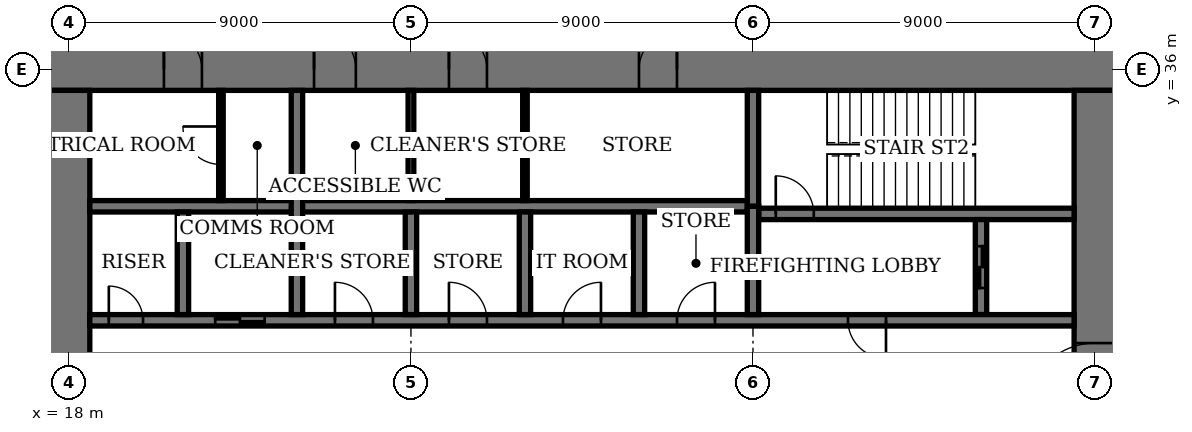
"""IFC4 building model, lengths in metres.
Left out: names, types, materials, properties, quantities, classifications, styles, units other than length and angle.
Written with IfcOpenShell. Run it as: python <this file> out.ifc"""

import sys

from ifc_helpers import new_model, si_unit, direction, frame, frame_2d, origin, place, context, subcontext, project, spatial, rectangle, extrude, element, fill, save


model = new_model("IFC4")
c1 = context("Model", 3, precision=1e-05, world=origin(), true_north=direction((0.0, 1.0)))
c2 = subcontext(c1, "Body", "Model", "MODEL_VIEW")
j1 = project(units=[si_unit("LENGTHUNIT", "METRE"), si_unit("PLANEANGLEUNIT", "RADIAN")], contexts=[c1])
p1 = place(None, origin())
s1 = spatial("IfcSite", under=j1, at=p1, CompositionType="ELEMENT")
p2 = place(p1, origin())
s2 = spatial("IfcBuilding", under=s1, at=p2, CompositionType="ELEMENT")
p3 = place(p2, frame((0.0, 0.0, 263.4)))
s3 = spatial("IfcBuildingStorey", under=s2, at=p3, CompositionType="ELEMENT", Elevation=263.4)
p4 = place(p3, frame((45.55, 36.0, 0.0), z_axis=(0.0, 0.0, 1.0), x_axis=(-1.0, 0.0, 0.0)))
e1 = element("IfcWall", 1, at=p4, inside=s3, PredefinedType="SHEAR", context=c2, shape_type="SweptSolid", body=[
    extrude(rectangle(XDim=28.1, YDim=1.1, at=frame_2d((14.05, 0.0))), origin(), (0.0, 0.0, 1.0), 4.0),
])
p5 = place(p4, frame((11.55, 0.0, 0.0)))
e2 = element("IfcOpeningElement", 2, at=p5, cuts=e1, PredefinedType="OPENING", context=c2, shape_type="SweptSolid", body=[
    extrude(rectangle(XDim=1.0, YDim=2.4, at=frame_2d((0.5, 1.2))), frame((0.0, 0.56, 0.0), z_axis=(0.0, -1.0, 0.0), x_axis=(1.0, 0.0, 0.0)), (0.0, 0.0, 1.0), 1.12),
])
p6 = place(p4, frame((16.55, 0.0, 0.0)))
e3 = element("IfcOpeningElement", 3, at=p6, cuts=e1, PredefinedType="OPENING", context=c2, shape_type="SweptSolid", body=[
    extrude(rectangle(XDim=1.0, YDim=2.4, at=frame_2d((0.5, 1.2))), frame((0.0, 0.56, 0.0), z_axis=(0.0, -1.0, 0.0), x_axis=(1.0, 0.0, 0.0)), (0.0, 0.0, 1.0), 1.12),
])
p7 = place(p4, frame((20.0, 0.0, 0.0)))
e4 = element("IfcOpeningElement", 4, at=p7, cuts=e1, PredefinedType="OPENING", context=c2, shape_type="SweptSolid", body=[
    extrude(rectangle(XDim=1.1, YDim=2.4, at=frame_2d((0.55, 1.2))), frame((0.0, 0.56, 0.0), z_axis=(0.0, -1.0, 0.0), x_axis=(1.0, 0.0, 0.0)), (0.0, 0.0, 1.0), 1.12),
])
p8 = place(p4, frame((24.05, 0.0, 0.0)))
e5 = element("IfcOpeningElement", 5, at=p8, cuts=e1, PredefinedType="OPENING", context=c2, shape_type="SweptSolid", body=[
    extrude(rectangle(XDim=1.0, YDim=2.4, at=frame_2d((0.5, 1.2))), frame((0.0, 0.56, 0.0), z_axis=(0.0, -1.0, 0.0), x_axis=(1.0, 0.0, 0.0)), (0.0, 0.0, 1.0), 1.12),
])
p9 = place(p3, frame((18.0, 35.45, 0.0), z_axis=(0.0, 0.0, 1.0), x_axis=(0.0, -1.0, 0.0)))
e6 = element("IfcWall", 6, at=p9, inside=s3, PredefinedType="SHEAR", context=c2, shape_type="SweptSolid", body=[
    extrude(rectangle(XDim=16.9, YDim=1.1, at=frame_2d((8.45, 0.0))), origin(), (0.0, 0.0, 1.0), 4.0),
])
p10 = place(p9, frame((8.45, 0.0, 0.0)))
e7 = element("IfcOpeningElement", 7, at=p10, cuts=e6, PredefinedType="OPENING", context=c2, shape_type="SweptSolid", body=[
    extrude(rectangle(XDim=1.8, YDim=2.4, at=frame_2d((0.9, 1.2))), frame((0.0, 0.56, 0.0), z_axis=(0.0, -1.0, 0.0), x_axis=(1.0, 0.0, 0.0)), (0.0, 0.0, 1.0), 1.12),
])
p11 = place(p3, frame((45.0, 18.55, 0.0), z_axis=(0.0, 0.0, 1.0), x_axis=(0.0, 1.0, 0.0)))
e8 = element("IfcWall", 8, at=p11, inside=s3, PredefinedType="SHEAR", context=c2, shape_type="SweptSolid", body=[
    extrude(rectangle(XDim=16.9, YDim=1.1, at=frame_2d((8.45, 0.0))), origin(), (0.0, 0.0, 1.0), 4.0),
])
p12 = place(p11, frame((8.45, 0.0, 0.0)))
e9 = element("IfcOpeningElement", 9, at=p12, cuts=e8, PredefinedType="OPENING", context=c2, shape_type="SweptSolid", body=[
    extrude(rectangle(XDim=1.8, YDim=2.4, at=frame_2d((0.9, 1.2))), frame((0.0, 0.56, 0.0), z_axis=(0.0, -1.0, 0.0), x_axis=(1.0, 0.0, 0.0)), (0.0, 0.0, 1.0), 1.12),
])
p13 = place(p3, frame((36.15, 32.2, 0.0), z_axis=(0.0, 0.0, 1.0), x_axis=(1.0, 0.0, 0.0)))
e10 = element("IfcWall", 10, at=p13, inside=s3, PredefinedType="SHEAR", context=c2, shape_type="SweptSolid", body=[
    extrude(rectangle(XDim=8.3, YDim=0.3, at=frame_2d((4.15, 0.0))), origin(), (0.0, 0.0, 1.0), 4.0),
])
p14 = place(p13, frame((0.45, 0.0, 0.0)))
e11 = element("IfcOpeningElement", 11, at=p14, cuts=e10, PredefinedType="OPENING", context=c2, shape_type="SweptSolid", body=[
    extrude(rectangle(XDim=1.0, YDim=2.4, at=frame_2d((0.5, 1.2))), frame((0.0, 0.16, 0.0), z_axis=(0.0, -1.0, 0.0), x_axis=(1.0, 0.0, 0.0)), (0.0, 0.0, 1.0), 0.32),
])
p15 = place(p3, frame((36.0, 32.4, 0.0), z_axis=(0.0, 0.0, 1.0), x_axis=(0.0, 1.0, 0.0)))
e12 = element("IfcWall", 12, at=p15, inside=s3, PredefinedType="SHEAR", context=c2, shape_type="SweptSolid", body=[
    extrude(rectangle(XDim=3.05, YDim=0.3, at=frame_2d((1.525, 0.0))), origin(), (0.0, 0.0, 1.0), 4.0),
])
p16 = place(p3, frame((42.0, 29.55, 0.0), z_axis=(0.0, 0.0, 1.0), x_axis=(0.0, 1.0, 0.0)))
e13 = element("IfcWall", 13, at=p16, inside=s3, PredefinedType="SHEAR", context=c2, shape_type="SweptSolid", body=[
    extrude(rectangle(XDim=2.5, YDim=0.3, at=frame_2d((1.25, 0.0))), origin(), (0.0, 0.0, 1.0), 4.0),
])
p17 = place(p16, frame((0.7, 0.0, 0.0)))
e14 = element("IfcOpeningElement", 14, at=p17, cuts=e13, PredefinedType="OPENING", context=c2, shape_type="SweptSolid", body=[
    extrude(rectangle(XDim=1.1, YDim=2.4, at=frame_2d((0.55, 1.2))), frame((0.0, 0.16, 0.0), z_axis=(0.0, -1.0, 0.0), x_axis=(1.0, 0.0, 0.0)), (0.0, 0.0, 1.0), 0.32),
])
p18 = place(p3, frame((18.55, 29.4, 0.0), z_axis=(0.0, 0.0, 1.0), x_axis=(1.0, 0.0, 0.0)))
e15 = element("IfcWall", 15, at=p18, inside=s3, PredefinedType="SHEAR", context=c2, shape_type="SweptSolid", body=[
    extrude(rectangle(XDim=25.9, YDim=0.3, at=frame_2d((12.95, 0.0))), origin(), (0.0, 0.0, 1.0), 4.0),
])
p19 = place(p18, frame((19.95, 0.0, 0.0)))
e16 = element("IfcOpeningElement", 16, at=p19, cuts=e15, PredefinedType="OPENING", context=c2, shape_type="SweptSolid", body=[
    extrude(rectangle(XDim=1.0, YDim=2.4, at=frame_2d((0.5, 1.2))), frame((0.0, 0.16, 0.0), z_axis=(0.0, -1.0, 0.0), x_axis=(1.0, 0.0, 0.0)), (0.0, 0.0, 1.0), 0.32),
])
p20 = place(p18, frame((0.5, 0.0, 0.0)))
e17 = element("IfcOpeningElement", 17, at=p20, cuts=e15, PredefinedType="OPENING", context=c2, shape_type="SweptSolid", body=[
    extrude(rectangle(XDim=0.9, YDim=2.1, at=frame_2d((0.45, 1.05))), frame((0.0, 0.16, 0.0), z_axis=(0.0, -1.0, 0.0), x_axis=(1.0, 0.0, 0.0)), (0.0, 0.0, 1.0), 0.32),
])
p21 = place(p18, frame((15.45, 0.0, 0.0)))
e18 = element("IfcOpeningElement", 18, at=p21, cuts=e15, PredefinedType="OPENING", context=c2, shape_type="SweptSolid", body=[
    extrude(rectangle(XDim=1.0, YDim=2.4, at=frame_2d((0.5, 1.2))), frame((0.0, 0.16, 0.0), z_axis=(0.0, -1.0, 0.0), x_axis=(1.0, 0.0, 0.0)), (0.0, 0.0, 1.0), 0.32),
])
p22 = place(p18, frame((12.45, 0.0, 0.0)))
e19 = element("IfcOpeningElement", 19, at=p22, cuts=e15, PredefinedType="OPENING", context=c2, shape_type="SweptSolid", body=[
    extrude(rectangle(XDim=1.0, YDim=2.4, at=frame_2d((0.5, 1.2))), frame((0.0, 0.16, 0.0), z_axis=(0.0, -1.0, 0.0), x_axis=(1.0, 0.0, 0.0)), (0.0, 0.0, 1.0), 0.32),
])
p23 = place(p18, frame((9.45, 0.0, 0.0)))
e20 = element("IfcOpeningElement", 20, at=p23, cuts=e15, PredefinedType="OPENING", context=c2, shape_type="SweptSolid", body=[
    extrude(rectangle(XDim=1.0, YDim=2.4, at=frame_2d((0.5, 1.2))), frame((0.0, 0.16, 0.0), z_axis=(0.0, -1.0, 0.0), x_axis=(1.0, 0.0, 0.0)), (0.0, 0.0, 1.0), 0.32),
])
p24 = place(p18, frame((6.45, 0.0, 0.0)))
e21 = element("IfcOpeningElement", 21, at=p24, cuts=e15, PredefinedType="OPENING", context=c2, shape_type="SweptSolid", body=[
    extrude(rectangle(XDim=1.0, YDim=2.4, at=frame_2d((0.5, 1.2))), frame((0.0, 0.16, 0.0), z_axis=(0.0, -1.0, 0.0), x_axis=(1.0, 0.0, 0.0)), (0.0, 0.0, 1.0), 0.32),
])
p25 = place(p18, frame((3.3, 0.0, 0.0)))
e22 = element("IfcOpeningElement", 22, at=p25, cuts=e15, PredefinedType="OPENING", context=c2, shape_type="SweptSolid", body=[
    extrude(rectangle(XDim=1.3, YDim=2.4, at=frame_2d((0.65, 1.2))), frame((0.0, 0.16, 0.0), z_axis=(0.0, -1.0, 0.0), x_axis=(1.0, 0.0, 0.0)), (0.0, 0.0, 1.0), 0.32),
])
p26 = place(p3, frame((18.55, 32.4, 0.0), z_axis=(0.0, 0.0, 1.0), x_axis=(1.0, 0.0, 0.0)))
e23 = element("IfcWall", 23, at=p26, inside=s3, PredefinedType="SHEAR", context=c2, shape_type="SweptSolid", body=[
    extrude(rectangle(XDim=17.3, YDim=0.3, at=frame_2d((8.65, 0.0))), origin(), (0.0, 0.0, 1.0), 4.0),
])
for number, where, z_axis, x_axis in (
    (24, (33.0, 29.55, 0.0), (0.0, 0.0, 1.0), (0.0, 1.0, 0.0)),
    (25, (30.0, 29.55, 0.0), (0.0, 0.0, 1.0), (0.0, 1.0, 0.0)),
    (26, (27.0, 29.55, 0.0), (0.0, 0.0, 1.0), (0.0, 1.0, 0.0)),
):
    element("IfcWall", number, at=place(p3, frame(where, z_axis=z_axis, x_axis=x_axis)), inside=s3, PredefinedType="SHEAR", context=c2, shape_type="SweptSolid", body=[
        extrude(rectangle(XDim=2.7, YDim=0.3, at=frame_2d((1.35, 0.0))), origin(), (0.0, 0.0, 1.0), 4.0),
    ])
p27 = place(p3, frame((24.0, 29.55, 0.0), z_axis=(0.0, 0.0, 1.0), x_axis=(0.0, 1.0, 0.0)))
e27 = element("IfcWall", 27, at=p27, inside=s3, PredefinedType="SHEAR", context=c2, shape_type="SweptSolid", body=[
    extrude(rectangle(XDim=5.9, YDim=0.3, at=frame_2d((2.95, 0.0))), origin(), (0.0, 0.0, 1.0), 4.0),
])
p28 = place(p3, frame((21.0, 29.55, 0.0), z_axis=(0.0, 0.0, 1.0), x_axis=(0.0, 1.0, 0.0)))
e28 = element("IfcWall", 28, at=p28, inside=s3, PredefinedType="SHEAR", context=c2, shape_type="SweptSolid", body=[
    extrude(rectangle(XDim=2.7, YDim=0.3, at=frame_2d((1.35, 0.0))), origin(), (0.0, 0.0, 1.0), 4.0),
])
p29 = place(p3, frame((36.0, 29.55, 0.0), z_axis=(0.0, 0.0, 1.0), x_axis=(0.0, 1.0, 0.0)))
e29 = element("IfcWall", 29, at=p29, inside=s3, PredefinedType="SHEAR", context=c2, shape_type="SweptSolid", body=[
    extrude(rectangle(XDim=2.85, YDim=0.3, at=frame_2d((1.425, 0.0))), origin(), (0.0, 0.0, 1.0), 4.0),
])
p30 = place(p3, frame((30.0, 32.55, 0.0), z_axis=(0.0, 0.0, 1.0), x_axis=(0.0, 1.0, 0.0)))
e30 = element("IfcWall", 30, at=p30, inside=s3, PredefinedType="PARTITIONING", context=c2, shape_type="SweptSolid", body=[
    extrude(rectangle(XDim=2.9, YDim=0.12, at=frame_2d((1.45, 0.0))), origin(), (0.0, 0.0, 1.0), 3.75),
])
p31 = place(p3, frame((27.0, 32.55, 0.0), z_axis=(0.0, 0.0, 1.0), x_axis=(0.0, 1.0, 0.0)))
e31 = element("IfcWall", 31, at=p31, inside=s3, PredefinedType="PARTITIONING", context=c2, shape_type="SweptSolid", body=[
    extrude(rectangle(XDim=2.9, YDim=0.15, at=frame_2d((1.45, 0.0))), origin(), (0.0, 0.0, 1.0), 3.75),
])
p32 = place(p3, frame((22.0, 32.55, 0.0), z_axis=(0.0, 0.0, 1.0), x_axis=(0.0, 1.0, 0.0)))
e32 = element("IfcWall", 32, at=p32, inside=s3, PredefinedType="PARTITIONING", context=c2, shape_type="SweptSolid", body=[
    extrude(rectangle(XDim=2.9, YDim=0.12, at=frame_2d((1.45, 0.0))), origin(), (0.0, 0.0, 1.0), 3.75),
])
p33 = place(p32, frame((0.95, 0.0, 0.0)))
e33 = element("IfcOpeningElement", 33, at=p33, cuts=e32, PredefinedType="OPENING", context=c2, shape_type="SweptSolid", body=[
    extrude(rectangle(XDim=1.0, YDim=2.4, at=frame_2d((0.5, 1.2))), frame((0.0, 0.07, 0.0), z_axis=(0.0, -1.0, 0.0), x_axis=(1.0, 0.0, 0.0)), (0.0, 0.0, 1.0), 0.14),
])
p34 = place(p12, origin())
e34 = element("IfcDoor", 34, at=p34, inside=s3, OperationType="DOUBLE_DOOR_DOUBLE_SWING", PredefinedType="DOOR", context=c2, shape_type="SweptSolid", body=[
    extrude(rectangle(XDim=1.8, YDim=2.4, at=frame_2d((0.9, 1.2))), frame((0.0, 0.03, 0.0), z_axis=(0.0, -1.0, 0.0), x_axis=(1.0, 0.0, 0.0)), (0.0, 0.0, 1.0), 0.06),
    extrude(rectangle(XDim=0.04, YDim=2.4, at=frame_2d((0.02, 1.2))), frame((0.0, 0.55, 0.0), z_axis=(0.0, -1.0, 0.0), x_axis=(1.0, 0.0, 0.0)), (0.0, 0.0, 1.0), 1.1),
    extrude(rectangle(XDim=0.04, YDim=2.4, at=frame_2d((1.78, 1.2))), frame((0.0, 0.55, 0.0), z_axis=(0.0, -1.0, 0.0), x_axis=(1.0, 0.0, 0.0)), (0.0, 0.0, 1.0), 1.1),
    extrude(rectangle(XDim=1.8, YDim=0.04, at=frame_2d((0.9, 2.38))), frame((0.0, 0.55, 0.0), z_axis=(0.0, -1.0, 0.0), x_axis=(1.0, 0.0, 0.0)), (0.0, 0.0, 1.0), 1.1),
])
fill(e9, e34)
p35 = place(p5, origin())
e35 = element("IfcDoor", 35, at=p35, inside=s3, OperationType="SINGLE_SWING_LEFT", PredefinedType="DOOR", context=c2, shape_type="SweptSolid", body=[
    extrude(rectangle(XDim=1.0, YDim=2.4, at=frame_2d((0.5, 1.2))), frame((0.0, 0.025, 0.0), z_axis=(0.0, -1.0, 0.0), x_axis=(1.0, 0.0, 0.0)), (0.0, 0.0, 1.0), 0.05),
    extrude(rectangle(XDim=0.04, YDim=2.4, at=frame_2d((0.02, 1.2))), frame((0.0, 0.4, 0.0), z_axis=(0.0, -1.0, 0.0), x_axis=(1.0, 0.0, 0.0)), (0.0, 0.0, 1.0), 0.8),
    extrude(rectangle(XDim=0.04, YDim=2.4, at=frame_2d((0.98, 1.2))), frame((0.0, 0.4, 0.0), z_axis=(0.0, -1.0, 0.0), x_axis=(1.0, 0.0, 0.0)), (0.0, 0.0, 1.0), 0.8),
    extrude(rectangle(XDim=1.0, YDim=0.04, at=frame_2d((0.5, 2.38))), frame((0.0, 0.4, 0.0), z_axis=(0.0, -1.0, 0.0), x_axis=(1.0, 0.0, 0.0)), (0.0, 0.0, 1.0), 0.8),
])
fill(e2, e35)
p36 = place(p6, origin())
e36 = element("IfcDoor", 36, at=p36, inside=s3, OperationType="SINGLE_SWING_RIGHT", PredefinedType="DOOR", context=c2, shape_type="SweptSolid", body=[
    extrude(rectangle(XDim=1.0, YDim=2.4, at=frame_2d((0.5, 1.2))), frame((0.0, 0.025, 0.0), z_axis=(0.0, -1.0, 0.0), x_axis=(1.0, 0.0, 0.0)), (0.0, 0.0, 1.0), 0.05),
    extrude(rectangle(XDim=0.04, YDim=2.4, at=frame_2d((0.02, 1.2))), frame((0.0, 0.4, 0.0), z_axis=(0.0, -1.0, 0.0), x_axis=(1.0, 0.0, 0.0)), (0.0, 0.0, 1.0), 0.8),
    extrude(rectangle(XDim=0.04, YDim=2.4, at=frame_2d((0.98, 1.2))), frame((0.0, 0.4, 0.0), z_axis=(0.0, -1.0, 0.0), x_axis=(1.0, 0.0, 0.0)), (0.0, 0.0, 1.0), 0.8),
    extrude(rectangle(XDim=1.0, YDim=0.04, at=frame_2d((0.5, 2.38))), frame((0.0, 0.4, 0.0), z_axis=(0.0, -1.0, 0.0), x_axis=(1.0, 0.0, 0.0)), (0.0, 0.0, 1.0), 0.8),
])
fill(e3, e36)
p37 = place(p7, origin())
e37 = element("IfcDoor", 37, at=p37, inside=s3, OperationType="SINGLE_SWING_RIGHT", PredefinedType="DOOR", context=c2, shape_type="SweptSolid", body=[
    extrude(rectangle(XDim=1.1, YDim=2.4, at=frame_2d((0.55, 1.2))), frame((0.0, 0.025, 0.0), z_axis=(0.0, -1.0, 0.0), x_axis=(1.0, 0.0, 0.0)), (0.0, 0.0, 1.0), 0.05),
    extrude(rectangle(XDim=0.04, YDim=2.4, at=frame_2d((0.02, 1.2))), frame((0.0, 0.44, 0.0), z_axis=(0.0, -1.0, 0.0), x_axis=(1.0, 0.0, 0.0)), (0.0, 0.0, 1.0), 0.88),
    extrude(rectangle(XDim=0.04, YDim=2.4, at=frame_2d((1.08, 1.2))), frame((0.0, 0.44, 0.0), z_axis=(0.0, -1.0, 0.0), x_axis=(1.0, 0.0, 0.0)), (0.0, 0.0, 1.0), 0.88),
    extrude(rectangle(XDim=1.1, YDim=0.04, at=frame_2d((0.55, 2.38))), frame((0.0, 0.44, 0.0), z_axis=(0.0, -1.0, 0.0), x_axis=(1.0, 0.0, 0.0)), (0.0, 0.0, 1.0), 0.88),
])
fill(e4, e37)
p38 = place(p8, origin())
e38 = element("IfcDoor", 38, at=p38, inside=s3, OperationType="SINGLE_SWING_RIGHT", PredefinedType="DOOR", context=c2, shape_type="SweptSolid", body=[
    extrude(rectangle(XDim=1.0, YDim=2.4, at=frame_2d((0.5, 1.2))), frame((0.0, 0.025, 0.0), z_axis=(0.0, -1.0, 0.0), x_axis=(1.0, 0.0, 0.0)), (0.0, 0.0, 1.0), 0.05),
    extrude(rectangle(XDim=0.04, YDim=2.4, at=frame_2d((0.02, 1.2))), frame((0.0, 0.4, 0.0), z_axis=(0.0, -1.0, 0.0), x_axis=(1.0, 0.0, 0.0)), (0.0, 0.0, 1.0), 0.8),
    extrude(rectangle(XDim=0.04, YDim=2.4, at=frame_2d((0.98, 1.2))), frame((0.0, 0.4, 0.0), z_axis=(0.0, -1.0, 0.0), x_axis=(1.0, 0.0, 0.0)), (0.0, 0.0, 1.0), 0.8),
    extrude(rectangle(XDim=1.0, YDim=0.04, at=frame_2d((0.5, 2.38))), frame((0.0, 0.4, 0.0), z_axis=(0.0, -1.0, 0.0), x_axis=(1.0, 0.0, 0.0)), (0.0, 0.0, 1.0), 0.8),
])
fill(e5, e38)
p39 = place(p14, origin())
e39 = element("IfcDoor", 39, at=p39, inside=s3, OperationType="SINGLE_SWING_RIGHT", PredefinedType="DOOR", context=c2, shape_type="SweptSolid", body=[
    extrude(rectangle(XDim=1.0, YDim=2.4, at=frame_2d((0.5, 1.2))), frame((0.0, 0.03, 0.0), z_axis=(0.0, -1.0, 0.0), x_axis=(1.0, 0.0, 0.0)), (0.0, 0.0, 1.0), 0.06),
])
fill(e11, e39)
p40 = place(p19, origin())
e40 = element("IfcDoor", 40, at=p40, inside=s3, OperationType="SINGLE_SWING_RIGHT", PredefinedType="DOOR", context=c2, shape_type="SweptSolid", body=[
    extrude(rectangle(XDim=1.0, YDim=2.4, at=frame_2d((0.5, 1.2))), frame((0.0, 0.03, 0.0), z_axis=(0.0, -1.0, 0.0), x_axis=(1.0, 0.0, 0.0)), (0.0, 0.0, 1.0), 0.06),
])
fill(e16, e40)
p41 = place(p20, origin())
e41 = element("IfcDoor", 41, at=p41, inside=s3, OperationType="SINGLE_SWING_RIGHT", PredefinedType="DOOR", context=c2, shape_type="SweptSolid", body=[
    extrude(rectangle(XDim=0.9, YDim=2.1, at=frame_2d((0.45, 1.05))), frame((0.0, 0.03, 0.0), z_axis=(0.0, -1.0, 0.0), x_axis=(1.0, 0.0, 0.0)), (0.0, 0.0, 1.0), 0.06),
])
fill(e17, e41)
p42 = place(p33, origin())
e42 = element("IfcDoor", 42, at=p42, inside=s3, OperationType="SINGLE_SWING_LEFT", PredefinedType="DOOR", context=c2, shape_type="SweptSolid", body=[
    extrude(rectangle(XDim=1.0, YDim=2.4, at=frame_2d((0.5, 1.2))), frame((0.0, 0.03, 0.0), z_axis=(0.0, -1.0, 0.0), x_axis=(1.0, 0.0, 0.0)), (0.0, 0.0, 1.0), 0.06),
])
fill(e33, e42)
p43 = place(p21, origin())
e43 = element("IfcDoor", 43, at=p43, inside=s3, OperationType="SINGLE_SWING_LEFT", PredefinedType="DOOR", context=c2, shape_type="SweptSolid", body=[
    extrude(rectangle(XDim=1.0, YDim=2.4, at=frame_2d((0.5, 1.2))), frame((0.0, 0.03, 0.0), z_axis=(0.0, -1.0, 0.0), x_axis=(1.0, 0.0, 0.0)), (0.0, 0.0, 1.0), 0.06),
])
fill(e18, e43)
p44 = place(p22, origin())
e44 = element("IfcDoor", 44, at=p44, inside=s3, OperationType="SINGLE_SWING_LEFT", PredefinedType="DOOR", context=c2, shape_type="SweptSolid", body=[
    extrude(rectangle(XDim=1.0, YDim=2.4, at=frame_2d((0.5, 1.2))), frame((0.0, 0.03, 0.0), z_axis=(0.0, -1.0, 0.0), x_axis=(1.0, 0.0, 0.0)), (0.0, 0.0, 1.0), 0.06),
])
fill(e19, e44)
p45 = place(p23, origin())
e45 = element("IfcDoor", 45, at=p45, inside=s3, OperationType="SINGLE_SWING_RIGHT", PredefinedType="DOOR", context=c2, shape_type="SweptSolid", body=[
    extrude(rectangle(XDim=1.0, YDim=2.4, at=frame_2d((0.5, 1.2))), frame((0.0, 0.03, 0.0), z_axis=(0.0, -1.0, 0.0), x_axis=(1.0, 0.0, 0.0)), (0.0, 0.0, 1.0), 0.06),
])
fill(e20, e45)
p46 = place(p24, origin())
e46 = element("IfcDoor", 46, at=p46, inside=s3, OperationType="SINGLE_SWING_RIGHT", PredefinedType="DOOR", context=c2, shape_type="SweptSolid", body=[
    extrude(rectangle(XDim=1.0, YDim=2.4, at=frame_2d((0.5, 1.2))), frame((0.0, 0.03, 0.0), z_axis=(0.0, -1.0, 0.0), x_axis=(1.0, 0.0, 0.0)), (0.0, 0.0, 1.0), 0.06),
])
fill(e21, e46)
p47 = place(p25, origin())
e47 = element("IfcDoor", 47, at=p47, inside=s3, OperationType="DOUBLE_DOOR_SLIDING", PredefinedType="DOOR", context=c2, shape_type="SweptSolid", body=[
    extrude(rectangle(XDim=1.3, YDim=2.4, at=frame_2d((0.65, 1.2))), frame((0.0, 0.02, 0.0), z_axis=(0.0, -1.0, 0.0), x_axis=(1.0, 0.0, 0.0)), (0.0, 0.0, 1.0), 0.04),
])
fill(e22, e47)
p48 = place(p17, origin())
e48 = element("IfcDoor", 48, at=p48, inside=s3, OperationType="DOUBLE_DOOR_SLIDING", PredefinedType="DOOR", context=c2, shape_type="SweptSolid", body=[
    extrude(rectangle(XDim=1.1, YDim=2.4, at=frame_2d((0.55, 1.2))), frame((0.0, 0.03, 0.0), z_axis=(0.0, -1.0, 0.0), x_axis=(1.0, 0.0, 0.0)), (0.0, 0.0, 1.0), 0.06),
])
fill(e14, e48)
save(model, sys.argv[1])
